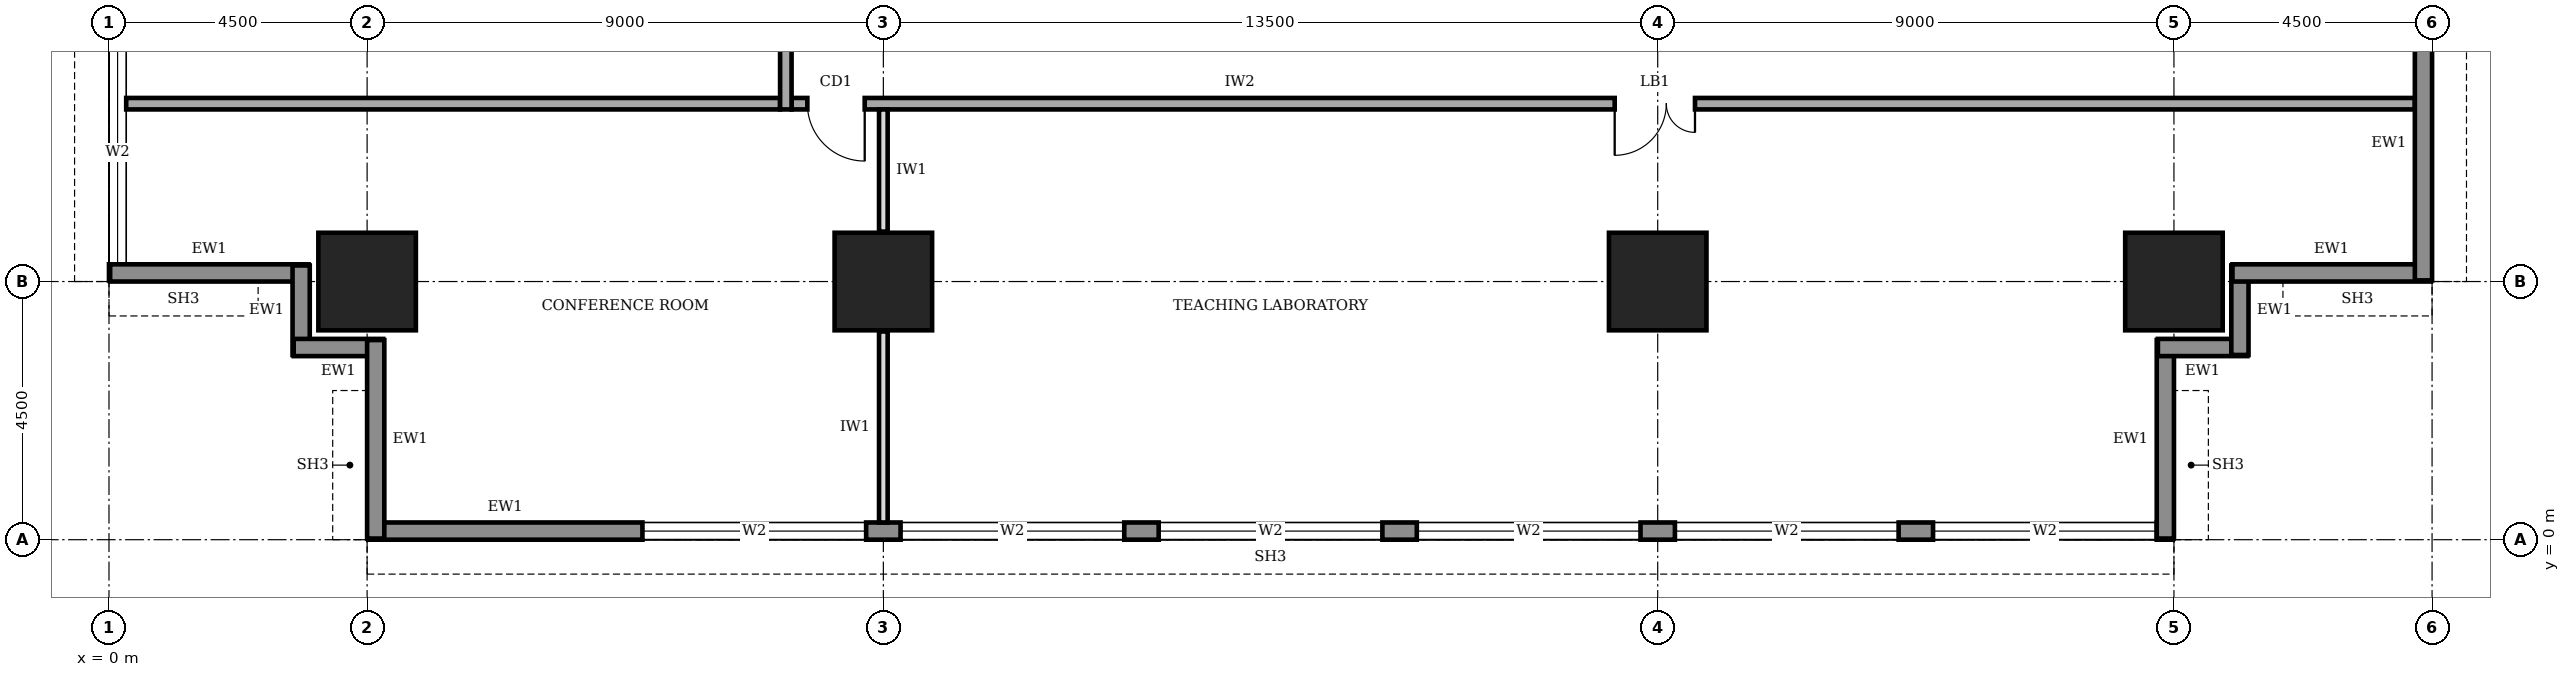
"""IFC4 building model, lengths in metres.
Left out: names, types, materials, properties, quantities, classifications, styles, units other than length and angle.
Written with IfcOpenShell. Run it as: python <this file> out.ifc"""

import sys

from ifc_helpers import new_model, si_unit, direction, frame, frame_2d, origin, origin_2d, place, context, subcontext, project, spatial, rectangle, extrude, element, fill, save


model = new_model("IFC4")
c1 = context("Model", 3, precision=1e-05, world=origin(), true_north=direction((0.0, 1.0)))
c2 = subcontext(c1, "Body", "Model", "MODEL_VIEW")
j1 = project(units=[si_unit("LENGTHUNIT", "METRE"), si_unit("PLANEANGLEUNIT", "RADIAN")], contexts=[c1])
p1 = place(None, origin())
s1 = spatial("IfcSite", under=j1, at=p1, CompositionType="ELEMENT")
p2 = place(p1, origin())
s2 = spatial("IfcBuilding", under=s1, at=p2, CompositionType="ELEMENT")
p3 = place(p2, frame((0.0, 0.0, 157.0)))
s3 = spatial("IfcBuildingStorey", under=s2, at=p3, CompositionType="ELEMENT", Elevation=157.0)
for number, where, z_axis, x_axis in (
    (1, (4.5, 4.5, 0.0), (0.0, 0.0, 1.0), (1.0, 0.0, 0.0)),
    (2, (13.5, 4.5, 0.0), (0.0, 0.0, 1.0), (1.0, 0.0, 0.0)),
    (3, (27.0, 4.5, 0.0), (0.0, 0.0, 1.0), (1.0, 0.0, 0.0)),
    (4, (36.0, 4.5, 0.0), (0.0, 0.0, 1.0), (1.0, 0.0, 0.0)),
):
    element("IfcColumn", number, at=place(p3, frame(where, z_axis=z_axis, x_axis=x_axis)), inside=s3, PredefinedType="COLUMN", context=c2, shape_type="SweptSolid", body=[
        extrude(rectangle(XDim=1.7, YDim=1.7, at=origin_2d()), origin(), (0.0, 0.0, 1.0), 4.0),
    ])
p4 = place(p3, frame((4.52, 0.15, 0.0), z_axis=(0.0, 0.0, 1.0), x_axis=(1.0, 0.0, 0.0)))
e5 = element("IfcWall", 5, at=p4, inside=s3, PredefinedType="STANDARD", context=c2, shape_type="SweptSolid", body=[
    extrude(rectangle(XDim=31.46, YDim=0.3, at=frame_2d((15.73, 0.0))), origin(), (0.0, 0.0, 1.0), 3.75),
])
p5 = place(p4, frame((4.78, 0.0, 0.6)))
e6 = element("IfcOpeningElement", 6, at=p5, cuts=e5, PredefinedType="OPENING", context=c2, shape_type="SweptSolid", body=[
    extrude(rectangle(XDim=3.9, YDim=2.6, at=frame_2d((1.95, 1.3))), frame((0.0, 0.16, 0.0), z_axis=(0.0, -1.0, 0.0), x_axis=(1.0, 0.0, 0.0)), (0.0, 0.0, 1.0), 0.32),
])
p6 = place(p4, frame((9.28, 0.0, 0.6)))
e7 = element("IfcOpeningElement", 7, at=p6, cuts=e5, PredefinedType="OPENING", context=c2, shape_type="SweptSolid", body=[
    extrude(rectangle(XDim=3.9, YDim=2.6, at=frame_2d((1.95, 1.3))), frame((0.0, 0.16, 0.0), z_axis=(0.0, -1.0, 0.0), x_axis=(1.0, 0.0, 0.0)), (0.0, 0.0, 1.0), 0.32),
])
p7 = place(p4, frame((13.78, 0.0, 0.6)))
e8 = element("IfcOpeningElement", 8, at=p7, cuts=e5, PredefinedType="OPENING", context=c2, shape_type="SweptSolid", body=[
    extrude(rectangle(XDim=3.9, YDim=2.6, at=frame_2d((1.95, 1.3))), frame((0.0, 0.16, 0.0), z_axis=(0.0, -1.0, 0.0), x_axis=(1.0, 0.0, 0.0)), (0.0, 0.0, 1.0), 0.32),
])
p8 = place(p4, frame((18.28, 0.0, 0.6)))
e9 = element("IfcOpeningElement", 9, at=p8, cuts=e5, PredefinedType="OPENING", context=c2, shape_type="SweptSolid", body=[
    extrude(rectangle(XDim=3.9, YDim=2.6, at=frame_2d((1.95, 1.3))), frame((0.0, 0.16, 0.0), z_axis=(0.0, -1.0, 0.0), x_axis=(1.0, 0.0, 0.0)), (0.0, 0.0, 1.0), 0.32),
])
p9 = place(p4, frame((22.78, 0.0, 0.6)))
e10 = element("IfcOpeningElement", 10, at=p9, cuts=e5, PredefinedType="OPENING", context=c2, shape_type="SweptSolid", body=[
    extrude(rectangle(XDim=3.9, YDim=2.6, at=frame_2d((1.95, 1.3))), frame((0.0, 0.16, 0.0), z_axis=(0.0, -1.0, 0.0), x_axis=(1.0, 0.0, 0.0)), (0.0, 0.0, 1.0), 0.32),
])
p10 = place(p4, frame((27.28, 0.0, 0.6)))
e11 = element("IfcOpeningElement", 11, at=p10, cuts=e5, PredefinedType="OPENING", context=c2, shape_type="SweptSolid", body=[
    extrude(rectangle(XDim=3.9, YDim=2.6, at=frame_2d((1.95, 1.3))), frame((0.0, 0.16, 0.0), z_axis=(0.0, -1.0, 0.0), x_axis=(1.0, 0.0, 0.0)), (0.0, 0.0, 1.0), 0.32),
])
p11 = place(p3, frame((35.85, 0.02, 0.0), z_axis=(0.0, 0.0, 1.0), x_axis=(0.0, 1.0, 0.0)))
e12 = element("IfcWall", 12, at=p11, inside=s3, PredefinedType="STANDARD", context=c2, shape_type="SweptSolid", body=[
    extrude(rectangle(XDim=3.46, YDim=0.3, at=frame_2d((1.73, 0.0))), origin(), (0.0, 0.0, 1.0), 2.85),
])
for number, where, z_axis, x_axis in (
    (13, (35.72, 3.35, 0.0), (0.0, 0.0, 1.0), (1.0, 0.0, 0.0)),
    (14, (37.15, 3.22, 0.0), (0.0, 0.0, 1.0), (0.0, 1.0, 0.0)),
):
    element("IfcWall", number, at=place(p3, frame(where, z_axis=z_axis, x_axis=x_axis)), inside=s3, PredefinedType="STANDARD", context=c2, shape_type="SweptSolid", body=[
        extrude(rectangle(XDim=1.56, YDim=0.3, at=frame_2d((0.78, 0.0))), origin(), (0.0, 0.0, 1.0), 3.75),
    ])
p12 = place(p3, frame((37.02, 4.65, 0.0), z_axis=(0.0, 0.0, 1.0), x_axis=(1.0, 0.0, 0.0)))
e15 = element("IfcWall", 15, at=p12, inside=s3, PredefinedType="STANDARD", context=c2, shape_type="SweptSolid", body=[
    extrude(rectangle(XDim=3.46, YDim=0.3, at=frame_2d((1.73, 0.0))), origin(), (0.0, 0.0, 1.0), 2.85),
])
p13 = place(p3, frame((40.35, 4.52, 0.0), z_axis=(0.0, 0.0, 1.0), x_axis=(0.0, 1.0, 0.0)))
e16 = element("IfcWall", 16, at=p13, inside=s3, PredefinedType="STANDARD", context=c2, shape_type="SweptSolid", body=[
    extrude(rectangle(XDim=31.46, YDim=0.3, at=frame_2d((15.73, 0.0))), origin(), (0.0, 0.0, 1.0), 3.75),
])
p14 = place(p13, frame((4.78, 0.0, 0.6)))
e17 = element("IfcOpeningElement", 17, at=p14, cuts=e16, PredefinedType="OPENING", context=c2, shape_type="SweptSolid", body=[
    extrude(rectangle(XDim=3.9, YDim=2.6, at=frame_2d((1.95, 1.3))), frame((0.0, 0.16, 0.0), z_axis=(0.0, -1.0, 0.0), x_axis=(1.0, 0.0, 0.0)), (0.0, 0.0, 1.0), 0.32),
])
p15 = place(p13, frame((9.28, 0.0, 0.6)))
e18 = element("IfcOpeningElement", 18, at=p15, cuts=e16, PredefinedType="OPENING", context=c2, shape_type="SweptSolid", body=[
    extrude(rectangle(XDim=3.9, YDim=2.6, at=frame_2d((1.95, 1.3))), frame((0.0, 0.16, 0.0), z_axis=(0.0, -1.0, 0.0), x_axis=(1.0, 0.0, 0.0)), (0.0, 0.0, 1.0), 0.32),
])
p16 = place(p13, frame((13.78, 0.0, 0.6)))
e19 = element("IfcOpeningElement", 19, at=p16, cuts=e16, PredefinedType="OPENING", context=c2, shape_type="SweptSolid", body=[
    extrude(rectangle(XDim=3.9, YDim=2.6, at=frame_2d((1.95, 1.3))), frame((0.0, 0.16, 0.0), z_axis=(0.0, -1.0, 0.0), x_axis=(1.0, 0.0, 0.0)), (0.0, 0.0, 1.0), 0.32),
])
p17 = place(p13, frame((18.28, 0.0, 0.6)))
e20 = element("IfcOpeningElement", 20, at=p17, cuts=e16, PredefinedType="OPENING", context=c2, shape_type="SweptSolid", body=[
    extrude(rectangle(XDim=3.9, YDim=2.6, at=frame_2d((1.95, 1.3))), frame((0.0, 0.16, 0.0), z_axis=(0.0, -1.0, 0.0), x_axis=(1.0, 0.0, 0.0)), (0.0, 0.0, 1.0), 0.32),
])
p18 = place(p13, frame((22.78, 0.0, 0.6)))
e21 = element("IfcOpeningElement", 21, at=p18, cuts=e16, PredefinedType="OPENING", context=c2, shape_type="SweptSolid", body=[
    extrude(rectangle(XDim=3.9, YDim=2.6, at=frame_2d((1.95, 1.3))), frame((0.0, 0.16, 0.0), z_axis=(0.0, -1.0, 0.0), x_axis=(1.0, 0.0, 0.0)), (0.0, 0.0, 1.0), 0.32),
])
p19 = place(p13, frame((27.28, 0.0, 0.6)))
e22 = element("IfcOpeningElement", 22, at=p19, cuts=e16, PredefinedType="OPENING", context=c2, shape_type="SweptSolid", body=[
    extrude(rectangle(XDim=3.9, YDim=2.6, at=frame_2d((1.95, 1.3))), frame((0.0, 0.16, 0.0), z_axis=(0.0, -1.0, 0.0), x_axis=(1.0, 0.0, 0.0)), (0.0, 0.0, 1.0), 0.32),
])
p20 = place(p3, frame((0.15, 35.98, 0.0), z_axis=(0.0, 0.0, 1.0), x_axis=(0.0, -1.0, 0.0)))
e23 = element("IfcWall", 23, at=p20, inside=s3, PredefinedType="STANDARD", context=c2, shape_type="SweptSolid", body=[
    extrude(rectangle(XDim=31.46, YDim=0.3, at=frame_2d((15.73, 0.0))), origin(), (0.0, 0.0, 1.0), 3.75),
])
p21 = place(p20, frame((27.28, 0.0, 0.6)))
e24 = element("IfcOpeningElement", 24, at=p21, cuts=e23, PredefinedType="OPENING", context=c2, shape_type="SweptSolid", body=[
    extrude(rectangle(XDim=3.9, YDim=2.6, at=frame_2d((1.95, 1.3))), frame((0.0, 0.16, 0.0), z_axis=(0.0, -1.0, 0.0), x_axis=(1.0, 0.0, 0.0)), (0.0, 0.0, 1.0), 0.32),
])
p22 = place(p20, frame((22.78, 0.0, 0.6)))
e25 = element("IfcOpeningElement", 25, at=p22, cuts=e23, PredefinedType="OPENING", context=c2, shape_type="SweptSolid", body=[
    extrude(rectangle(XDim=3.9, YDim=2.6, at=frame_2d((1.95, 1.3))), frame((0.0, 0.16, 0.0), z_axis=(0.0, -1.0, 0.0), x_axis=(1.0, 0.0, 0.0)), (0.0, 0.0, 1.0), 0.32),
])
p23 = place(p20, frame((18.28, 0.0, 0.6)))
e26 = element("IfcOpeningElement", 26, at=p23, cuts=e23, PredefinedType="OPENING", context=c2, shape_type="SweptSolid", body=[
    extrude(rectangle(XDim=3.9, YDim=2.6, at=frame_2d((1.95, 1.3))), frame((0.0, 0.16, 0.0), z_axis=(0.0, -1.0, 0.0), x_axis=(1.0, 0.0, 0.0)), (0.0, 0.0, 1.0), 0.32),
])
p24 = place(p20, frame((13.78, 0.0, 0.6)))
e27 = element("IfcOpeningElement", 27, at=p24, cuts=e23, PredefinedType="OPENING", context=c2, shape_type="SweptSolid", body=[
    extrude(rectangle(XDim=3.9, YDim=2.6, at=frame_2d((1.95, 1.3))), frame((0.0, 0.16, 0.0), z_axis=(0.0, -1.0, 0.0), x_axis=(1.0, 0.0, 0.0)), (0.0, 0.0, 1.0), 0.32),
])
p25 = place(p20, frame((9.28, 0.0, 0.6)))
e28 = element("IfcOpeningElement", 28, at=p25, cuts=e23, PredefinedType="OPENING", context=c2, shape_type="SweptSolid", body=[
    extrude(rectangle(XDim=3.9, YDim=2.6, at=frame_2d((1.95, 1.3))), frame((0.0, 0.16, 0.0), z_axis=(0.0, -1.0, 0.0), x_axis=(1.0, 0.0, 0.0)), (0.0, 0.0, 1.0), 0.32),
])
p26 = place(p20, frame((4.78, 0.0, 0.6)))
e29 = element("IfcOpeningElement", 29, at=p26, cuts=e23, PredefinedType="OPENING", context=c2, shape_type="SweptSolid", body=[
    extrude(rectangle(XDim=3.9, YDim=2.6, at=frame_2d((1.95, 1.3))), frame((0.0, 0.16, 0.0), z_axis=(0.0, -1.0, 0.0), x_axis=(1.0, 0.0, 0.0)), (0.0, 0.0, 1.0), 0.32),
])
p27 = place(p3, frame((0.02, 4.65, 0.0), z_axis=(0.0, 0.0, 1.0), x_axis=(1.0, 0.0, 0.0)))
e30 = element("IfcWall", 30, at=p27, inside=s3, PredefinedType="STANDARD", context=c2, shape_type="SweptSolid", body=[
    extrude(rectangle(XDim=3.46, YDim=0.3, at=frame_2d((1.73, 0.0))), origin(), (0.0, 0.0, 1.0), 2.85),
])
for number, where, z_axis, x_axis in (
    (31, (3.35, 4.78, 0.0), (0.0, 0.0, 1.0), (0.0, -1.0, 0.0)),
    (32, (3.22, 3.35, 0.0), (0.0, 0.0, 1.0), (1.0, 0.0, 0.0)),
):
    element("IfcWall", number, at=place(p3, frame(where, z_axis=z_axis, x_axis=x_axis)), inside=s3, PredefinedType="STANDARD", context=c2, shape_type="SweptSolid", body=[
        extrude(rectangle(XDim=1.56, YDim=0.3, at=frame_2d((0.78, 0.0))), origin(), (0.0, 0.0, 1.0), 3.75),
    ])
p28 = place(p3, frame((4.65, 3.48, 0.0), z_axis=(0.0, 0.0, 1.0), x_axis=(0.0, -1.0, 0.0)))
e33 = element("IfcWall", 33, at=p28, inside=s3, PredefinedType="STANDARD", context=c2, shape_type="SweptSolid", body=[
    extrude(rectangle(XDim=3.46, YDim=0.3, at=frame_2d((1.73, 0.0))), origin(), (0.0, 0.0, 1.0), 2.85),
])
p29 = place(p3, frame((11.9, 7.6, 0.0), z_axis=(0.0, 0.0, 1.0), x_axis=(1.0, 0.0, 0.0)))
e34 = element("IfcWall", 34, at=p29, inside=s3, PredefinedType="SOLIDWALL", context=c2, shape_type="SweptSolid", body=[
    extrude(rectangle(XDim=28.3, YDim=0.2, at=frame_2d((14.15, 0.0))), origin(), (0.0, 0.0, 1.0), 3.75),
])
p30 = place(p29, frame((0.275, 0.0, 0.0)))
e35 = element("IfcOpeningElement", 35, at=p30, cuts=e34, PredefinedType="OPENING", context=c2, shape_type="SweptSolid", body=[
    extrude(rectangle(XDim=1.0, YDim=2.1, at=frame_2d((0.5, 1.05))), frame((0.0, 0.11, 0.0), z_axis=(0.0, -1.0, 0.0), x_axis=(1.0, 0.0, 0.0)), (0.0, 0.0, 1.0), 0.22),
])
p31 = place(p29, frame((14.35, 0.0, 0.0)))
e36 = element("IfcOpeningElement", 36, at=p31, cuts=e34, PredefinedType="OPENING", context=c2, shape_type="SweptSolid", body=[
    extrude(rectangle(XDim=1.4, YDim=2.1, at=frame_2d((0.7, 1.05))), frame((0.0, 0.11, 0.0), z_axis=(0.0, -1.0, 0.0), x_axis=(1.0, 0.0, 0.0)), (0.0, 0.0, 1.0), 0.22),
])
p32 = place(p3, frame((11.8, 32.8, 0.0), z_axis=(0.0, 0.0, 1.0), x_axis=(0.0, -1.0, 0.0)))
e37 = element("IfcWall", 37, at=p32, inside=s3, PredefinedType="SOLIDWALL", context=c2, shape_type="SweptSolid", body=[
    extrude(rectangle(XDim=25.3, YDim=0.2, at=frame_2d((12.65, 0.0))), origin(), (0.0, 0.0, 1.0), 3.75),
])
p33 = place(p32, frame((21.8, 0.0, 0.0)))
e38 = element("IfcOpeningElement", 38, at=p33, cuts=e37, PredefinedType="OPENING", context=c2, shape_type="SweptSolid", body=[
    extrude(rectangle(XDim=1.0, YDim=2.1, at=frame_2d((0.5, 1.05))), frame((0.0, 0.11, 0.0), z_axis=(0.0, -1.0, 0.0), x_axis=(1.0, 0.0, 0.0)), (0.0, 0.0, 1.0), 0.22),
])
p34 = place(p32, frame((17.7, 0.0, 0.0)))
e39 = element("IfcOpeningElement", 39, at=p34, cuts=e37, PredefinedType="OPENING", context=c2, shape_type="SweptSolid", body=[
    extrude(rectangle(XDim=1.0, YDim=2.1, at=frame_2d((0.5, 1.05))), frame((0.0, 0.11, 0.0), z_axis=(0.0, -1.0, 0.0), x_axis=(1.0, 0.0, 0.0)), (0.0, 0.0, 1.0), 0.22),
])
p35 = place(p32, frame((14.7, 0.0, 0.0)))
e40 = element("IfcOpeningElement", 40, at=p35, cuts=e37, PredefinedType="OPENING", context=c2, shape_type="SweptSolid", body=[
    extrude(rectangle(XDim=0.9, YDim=2.1, at=frame_2d((0.45, 1.05))), frame((0.0, 0.11, 0.0), z_axis=(0.0, -1.0, 0.0), x_axis=(1.0, 0.0, 0.0)), (0.0, 0.0, 1.0), 0.22),
])
p36 = place(p32, frame((11.65, 0.0, 0.0)))
e41 = element("IfcOpeningElement", 41, at=p36, cuts=e37, PredefinedType="OPENING", context=c2, shape_type="SweptSolid", body=[
    extrude(rectangle(XDim=0.9, YDim=2.1, at=frame_2d((0.45, 1.05))), frame((0.0, 0.11, 0.0), z_axis=(0.0, -1.0, 0.0), x_axis=(1.0, 0.0, 0.0)), (0.0, 0.0, 1.0), 0.22),
])
p37 = place(p32, frame((6.95, 0.0, 0.0)))
e42 = element("IfcOpeningElement", 42, at=p37, cuts=e37, PredefinedType="OPENING", context=c2, shape_type="SweptSolid", body=[
    extrude(rectangle(XDim=0.9, YDim=2.1, at=frame_2d((0.45, 1.05))), frame((0.0, 0.11, 0.0), z_axis=(0.0, -1.0, 0.0), x_axis=(1.0, 0.0, 0.0)), (0.0, 0.0, 1.0), 0.22),
])
p38 = place(p32, frame((9.5, 0.0, 0.0)))
e43 = element("IfcOpeningElement", 43, at=p38, cuts=e37, PredefinedType="OPENING", context=c2, shape_type="SweptSolid", body=[
    extrude(rectangle(XDim=1.0, YDim=2.1, at=frame_2d((0.5, 1.05))), frame((0.0, 0.11, 0.0), z_axis=(0.0, -1.0, 0.0), x_axis=(1.0, 0.0, 0.0)), (0.0, 0.0, 1.0), 0.22),
])
p39 = place(p32, frame((2.3, 0.0, 0.0)))
e44 = element("IfcOpeningElement", 44, at=p39, cuts=e37, PredefinedType="OPENING", context=c2, shape_type="SweptSolid", body=[
    extrude(rectangle(XDim=1.0, YDim=2.1, at=frame_2d((0.5, 1.05))), frame((0.0, 0.11, 0.0), z_axis=(0.0, -1.0, 0.0), x_axis=(1.0, 0.0, 0.0)), (0.0, 0.0, 1.0), 0.22),
])
p40 = place(p3, frame((0.3, 7.6, 0.0), z_axis=(0.0, 0.0, 1.0), x_axis=(1.0, 0.0, 0.0)))
e45 = element("IfcWall", 45, at=p40, inside=s3, PredefinedType="SOLIDWALL", context=c2, shape_type="SweptSolid", body=[
    extrude(rectangle(XDim=11.4, YDim=0.2, at=frame_2d((5.7, 0.0))), origin(), (0.0, 0.0, 1.0), 3.75),
])
p41 = place(p3, frame((13.5, 0.3, 0.0), z_axis=(0.0, 0.0, 1.0), x_axis=(0.0, 1.0, 0.0)))
e46 = element("IfcWall", 46, at=p41, inside=s3, PredefinedType="PARTITIONING", context=c2, shape_type="SweptSolid", body=[
    extrude(rectangle(XDim=3.33, YDim=0.15, at=frame_2d((1.665, 0.0))), origin(), (0.0, 0.0, 1.0), 2.85),
])
p42 = place(p3, frame((13.5, 5.37, 0.0), z_axis=(0.0, 0.0, 1.0), x_axis=(0.0, 1.0, 0.0)))
e47 = element("IfcWall", 47, at=p42, inside=s3, PredefinedType="PARTITIONING", context=c2, shape_type="SweptSolid", body=[
    extrude(rectangle(XDim=2.13, YDim=0.15, at=frame_2d((1.065, 0.0))), origin(), (0.0, 0.0, 1.0), 2.85),
])
p43 = place(p5, origin())
e48 = element("IfcWindow", 48, at=p43, inside=s3, PartitioningType="SINGLE_PANEL", PredefinedType="WINDOW", context=c2, shape_type="SweptSolid", body=[
    extrude(rectangle(XDim=3.9, YDim=2.6, at=frame_2d((1.95, 1.3))), frame((0.0, 0.03, 0.0), z_axis=(0.0, -1.0, 0.0), x_axis=(1.0, 0.0, 0.0)), (0.0, 0.0, 1.0), 0.06),
])
fill(e6, e48)
p44 = place(p6, origin())
e49 = element("IfcWindow", 49, at=p44, inside=s3, PartitioningType="SINGLE_PANEL", PredefinedType="WINDOW", context=c2, shape_type="SweptSolid", body=[
    extrude(rectangle(XDim=3.9, YDim=2.6, at=frame_2d((1.95, 1.3))), frame((0.0, 0.03, 0.0), z_axis=(0.0, -1.0, 0.0), x_axis=(1.0, 0.0, 0.0)), (0.0, 0.0, 1.0), 0.06),
])
fill(e7, e49)
p45 = place(p7, origin())
e50 = element("IfcWindow", 50, at=p45, inside=s3, PartitioningType="SINGLE_PANEL", PredefinedType="WINDOW", context=c2, shape_type="SweptSolid", body=[
    extrude(rectangle(XDim=3.9, YDim=2.6, at=frame_2d((1.95, 1.3))), frame((0.0, 0.03, 0.0), z_axis=(0.0, -1.0, 0.0), x_axis=(1.0, 0.0, 0.0)), (0.0, 0.0, 1.0), 0.06),
])
fill(e8, e50)
p46 = place(p8, origin())
e51 = element("IfcWindow", 51, at=p46, inside=s3, PartitioningType="SINGLE_PANEL", PredefinedType="WINDOW", context=c2, shape_type="SweptSolid", body=[
    extrude(rectangle(XDim=3.9, YDim=2.6, at=frame_2d((1.95, 1.3))), frame((0.0, 0.03, 0.0), z_axis=(0.0, -1.0, 0.0), x_axis=(1.0, 0.0, 0.0)), (0.0, 0.0, 1.0), 0.06),
])
fill(e9, e51)
p47 = place(p9, origin())
e52 = element("IfcWindow", 52, at=p47, inside=s3, PartitioningType="SINGLE_PANEL", PredefinedType="WINDOW", context=c2, shape_type="SweptSolid", body=[
    extrude(rectangle(XDim=3.9, YDim=2.6, at=frame_2d((1.95, 1.3))), frame((0.0, 0.03, 0.0), z_axis=(0.0, -1.0, 0.0), x_axis=(1.0, 0.0, 0.0)), (0.0, 0.0, 1.0), 0.06),
])
fill(e10, e52)
p48 = place(p10, origin())
e53 = element("IfcWindow", 53, at=p48, inside=s3, PartitioningType="SINGLE_PANEL", PredefinedType="WINDOW", context=c2, shape_type="SweptSolid", body=[
    extrude(rectangle(XDim=3.9, YDim=2.6, at=frame_2d((1.95, 1.3))), frame((0.0, 0.03, 0.0), z_axis=(0.0, -1.0, 0.0), x_axis=(1.0, 0.0, 0.0)), (0.0, 0.0, 1.0), 0.06),
])
fill(e11, e53)
p49 = place(p21, origin())
e54 = element("IfcWindow", 54, at=p49, inside=s3, PartitioningType="SINGLE_PANEL", PredefinedType="WINDOW", context=c2, shape_type="SweptSolid", body=[
    extrude(rectangle(XDim=3.9, YDim=2.6, at=frame_2d((1.95, 1.3))), frame((0.0, 0.03, 0.0), z_axis=(0.0, -1.0, 0.0), x_axis=(1.0, 0.0, 0.0)), (0.0, 0.0, 1.0), 0.06),
])
fill(e24, e54)
p50 = place(p30, frame((1.0, 0.0, 0.0), z_axis=(0.0, 0.0, 1.0), x_axis=(-1.0, 0.0, 0.0)))
e55 = element("IfcDoor", 55, at=p50, inside=s3, OperationType="SINGLE_SWING_LEFT", PredefinedType="DOOR", context=c2, shape_type="SweptSolid", body=[
    extrude(rectangle(XDim=1.0, YDim=2.1, at=frame_2d((0.5, 1.05))), frame((0.0, 0.025, 0.0), z_axis=(0.0, -1.0, 0.0), x_axis=(1.0, 0.0, 0.0)), (0.0, 0.0, 1.0), 0.05),
])
fill(e35, e55)
p51 = place(p31, frame((1.4, 0.0, 0.0), z_axis=(0.0, 0.0, 1.0), x_axis=(-1.0, 0.0, 0.0)))
e56 = element("IfcDoor", 56, at=p51, inside=s3, OperationType="DOUBLE_DOOR_SINGLE_SWING", PredefinedType="DOOR", context=c2, shape_type="SweptSolid", body=[
    extrude(rectangle(XDim=1.4, YDim=2.1, at=frame_2d((0.7, 1.05))), frame((0.0, 0.025, 0.0), z_axis=(0.0, -1.0, 0.0), x_axis=(1.0, 0.0, 0.0)), (0.0, 0.0, 1.0), 0.05),
])
fill(e36, e56)
save(model, sys.argv[1])
